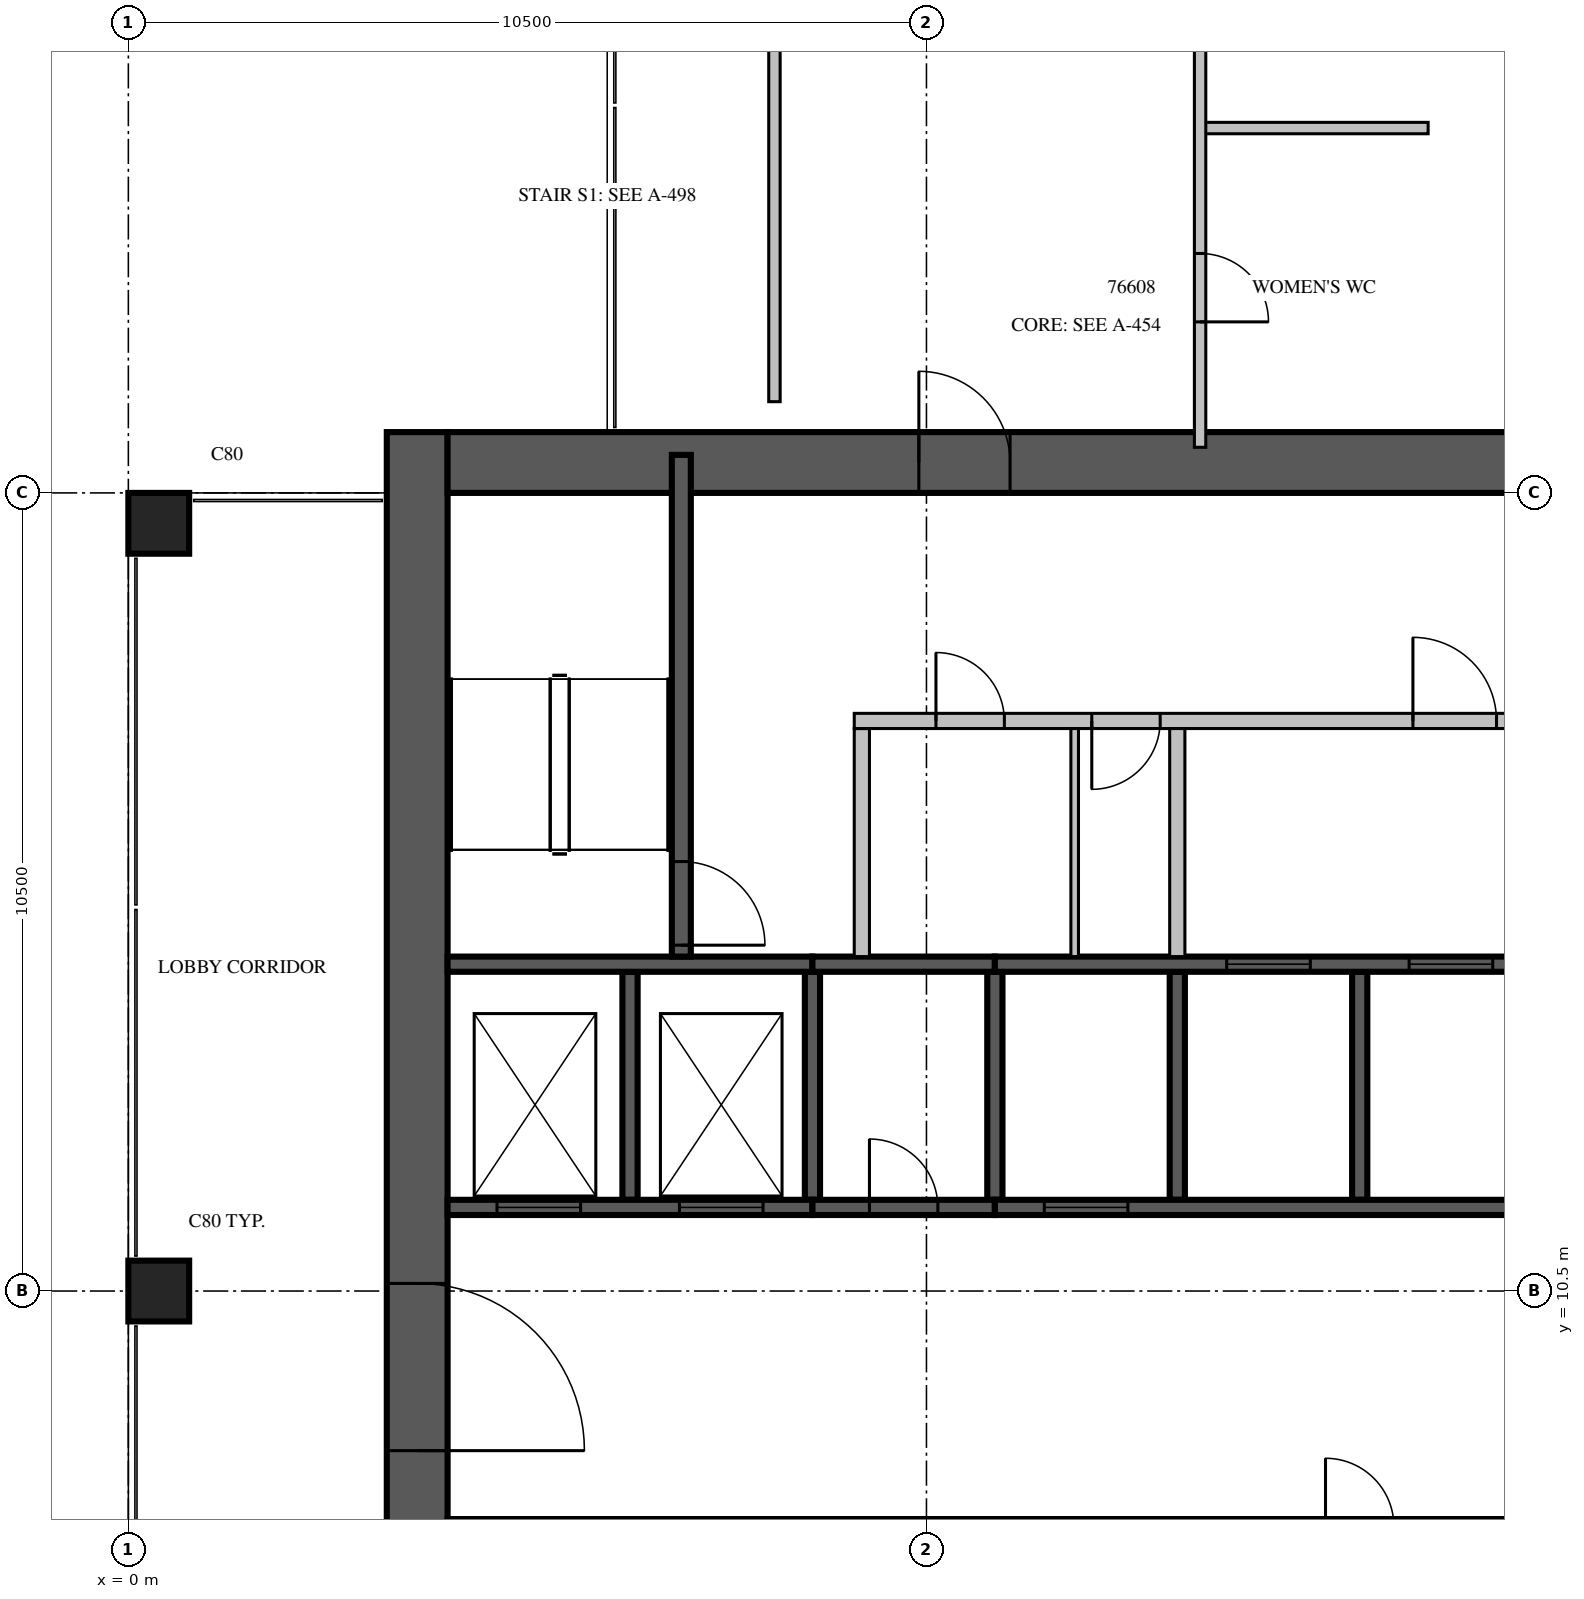
"""IFC4 building model, lengths in metres.
Left out: names, types, materials, properties, quantities, classifications, styles, units other than length and angle.
Written with IfcOpenShell. Run it as: python <this file> out.ifc"""

import sys

from ifc_helpers import new_model, si_unit, direction, frame, frame_2d, origin, origin_2d, place, context, subcontext, project, spatial, rectangle, extrude, source, transform, mapped, element, fill, save


model = new_model("IFC4")
c1 = context("Model", 3, precision=1e-05, world=origin(), true_north=direction((0.0, 1.0)))
c2 = subcontext(c1, "Body", "Model", "MODEL_VIEW")
j1 = project(units=[si_unit("LENGTHUNIT", "METRE"), si_unit("PLANEANGLEUNIT", "RADIAN")], contexts=[c1])
p1 = place(None, origin())
s1 = spatial("IfcSite", under=j1, at=p1, CompositionType="ELEMENT")
p2 = place(p1, origin())
s2 = spatial("IfcBuilding", under=s1, at=p2, CompositionType="ELEMENT")
p3 = place(p2, frame((0.0, 0.0, 277.0)))
s3 = spatial("IfcBuildingStorey", under=s2, at=p3, CompositionType="ELEMENT", Elevation=277.0)
m1 = source(origin(), c2, "Body", "SweptSolid", [
    extrude(rectangle(XDim=0.8, YDim=0.8, at=origin_2d()), origin(), (0.0, 0.0, 1.0), 7.5),
])
for number, where, z_axis, x_axis in (
    (1, (0.4, 10.5, 0.0), (0.0, 0.0, 1.0), (1.0, 0.0, 0.0)),
    (2, (0.4, 20.6, 0.0), (0.0, 0.0, 1.0), (1.0, 0.0, 0.0)),
):
    element("IfcColumn", number, at=place(p3, frame(where, z_axis=z_axis, x_axis=x_axis)), inside=s3, PredefinedType="COLUMN", context=c2, shape_type="MappedRepresentation", body=[
        mapped(m1, transform((0.0, 0.0, 0.0), scale=1.0)),
    ])
p4 = place(p3, frame((3.8, 4.2, 0.0), z_axis=(0.0, 0.0, 1.0), x_axis=(0.0, 1.0, 0.0)))
e3 = element("IfcWall", 3, at=p4, inside=s3, PredefinedType="SHEAR", context=c2, shape_type="SweptSolid", body=[
    extrude(rectangle(XDim=17.6, YDim=0.8, at=frame_2d((8.8, 0.0))), origin(), (0.0, 0.0, 1.0), 7.5),
])
m2 = source(origin(), c2, "Body", "SweptSolid", [
    extrude(rectangle(XDim=2.2, YDim=2.1, at=frame_2d((1.1, 1.05))), frame((0.0, 0.41, 0.0), z_axis=(0.0, -1.0, 0.0), x_axis=(1.0, 0.0, 0.0)), (0.0, 0.0, 1.0), 0.82),
])
p5 = place(p4, frame((4.2, 0.0, 0.0)))
e4 = element("IfcOpeningElement", 4, at=p5, cuts=e3, PredefinedType="OPENING", context=c2, shape_type="MappedRepresentation", body=[
    mapped(m2, transform((0.0, 0.0, 0.0), scale=1.0)),
])
m3 = source(origin(), c2, "Body", "SweptSolid", [
    extrude(rectangle(XDim=16.8, YDim=0.8, at=frame_2d((8.4, 0.0))), origin(), (0.0, 0.0, 1.0), 7.5),
])
p6 = place(p3, frame((4.2, 21.4, 0.0), z_axis=(0.0, 0.0, 1.0), x_axis=(1.0, 0.0, 0.0)))
e5 = element("IfcWall", 5, at=p6, inside=s3, PredefinedType="SHEAR", context=c2, shape_type="MappedRepresentation", body=[
    mapped(m3, transform((0.0, 0.0, 0.0), scale=1.0)),
])
m4 = source(origin(), c2, "Body", "SweptSolid", [
    extrude(rectangle(XDim=1.2, YDim=2.1, at=frame_2d((0.6, 1.05))), frame((0.0, 0.41, 0.0), z_axis=(0.0, -1.0, 0.0), x_axis=(1.0, 0.0, 0.0)), (0.0, 0.0, 1.0), 0.82),
])
p7 = place(p6, frame((6.2, 0.0, 0.0)))
e6 = element("IfcOpeningElement", 6, at=p7, cuts=e5, PredefinedType="OPENING", context=c2, shape_type="MappedRepresentation", body=[
    mapped(m4, transform((0.0, 0.0, 0.0), scale=1.0)),
])
m5 = source(origin(), c2, "Body", "SweptSolid", [
    extrude(rectangle(XDim=3.0, YDim=0.2, at=frame_2d((1.5, 0.0))), origin(), (0.0, 0.0, 1.0), 7.5),
])
p8 = place(p3, frame((6.6, 11.7, 0.0), z_axis=(0.0, 0.0, 1.0), x_axis=(0.0, 1.0, 0.0)))
e7 = element("IfcWall", 7, at=p8, inside=s3, PredefinedType="SOLIDWALL", context=c2, shape_type="MappedRepresentation", body=[
    mapped(m5, transform((0.0, 0.0, 0.0), scale=1.0)),
])
m6 = source(origin(), c2, "Body", "SweptSolid", [
    extrude(rectangle(XDim=3.0, YDim=0.2, at=frame_2d((1.5, 0.0))), origin(), (0.0, 0.0, 1.0), 7.1),
])
for number, where, z_axis, x_axis in (
    (8, (9.0, 11.7, 0.0), (0.0, 0.0, 1.0), (0.0, 1.0, 0.0)),
    (9, (11.4, 11.7, 0.0), (0.0, 0.0, 1.0), (0.0, 1.0, 0.0)),
):
    element("IfcWall", number, at=place(p3, frame(where, z_axis=z_axis, x_axis=x_axis)), inside=s3, PredefinedType="SOLIDWALL", context=c2, shape_type="MappedRepresentation", body=[
        mapped(m6, transform((0.0, 0.0, 0.0), scale=1.0)),
    ])
for number, where, z_axis, x_axis in (
    (10, (13.8, 11.7, 0.0), (0.0, 0.0, 1.0), (0.0, 1.0, 0.0)),
    (11, (16.2, 11.7, 0.0), (0.0, 0.0, 1.0), (0.0, 1.0, 0.0)),
):
    element("IfcWall", number, at=place(p3, frame(where, z_axis=z_axis, x_axis=x_axis)), inside=s3, PredefinedType="SOLIDWALL", context=c2, shape_type="MappedRepresentation", body=[
        mapped(m5, transform((0.0, 0.0, 0.0), scale=1.0)),
    ])
m7 = source(origin(), c2, "Body", "SweptSolid", [
    extrude(rectangle(XDim=4.8, YDim=0.2, at=frame_2d((2.4, 0.0))), origin(), (0.0, 0.0, 1.0), 7.5),
])
p9 = place(p3, frame((4.2, 11.6, 0.0), z_axis=(0.0, 0.0, 1.0), x_axis=(1.0, 0.0, 0.0)))
e12 = element("IfcWall", 12, at=p9, inside=s3, PredefinedType="SOLIDWALL", context=c2, shape_type="MappedRepresentation", body=[
    mapped(m7, transform((0.0, 0.0, 0.0), scale=1.0)),
])
m8 = source(origin(), c2, "Body", "SweptSolid", [
    extrude(rectangle(XDim=1.1, YDim=2.1, at=frame_2d((0.55, 1.05))), frame((0.0, 0.11, 0.0), z_axis=(0.0, -1.0, 0.0), x_axis=(1.0, 0.0, 0.0)), (0.0, 0.0, 1.0), 0.22),
])
p10 = place(p9, frame((0.65, 0.0, 0.0)))
e13 = element("IfcOpeningElement", 13, at=p10, cuts=e12, PredefinedType="OPENING", context=c2, shape_type="MappedRepresentation", body=[
    mapped(m8, transform((0.0, 0.0, 0.0), scale=1.0)),
])
p11 = place(p9, frame((3.05, 0.0, 0.0)))
e14 = element("IfcOpeningElement", 14, at=p11, cuts=e12, PredefinedType="OPENING", context=c2, shape_type="MappedRepresentation", body=[
    mapped(m8, transform((0.0, 0.0, 0.0), scale=1.0)),
])
m9 = source(origin(), c2, "Body", "SweptSolid", [
    extrude(rectangle(XDim=2.4, YDim=0.2, at=frame_2d((1.2, 0.0))), origin(), (0.0, 0.0, 1.0), 7.1),
])
p12 = place(p3, frame((9.0, 11.6, 0.0), z_axis=(0.0, 0.0, 1.0), x_axis=(1.0, 0.0, 0.0)))
e15 = element("IfcWall", 15, at=p12, inside=s3, PredefinedType="SOLIDWALL", context=c2, shape_type="MappedRepresentation", body=[
    mapped(m9, transform((0.0, 0.0, 0.0), scale=1.0)),
])
m10 = source(origin(), c2, "Body", "SweptSolid", [
    extrude(rectangle(XDim=0.9, YDim=2.1, at=frame_2d((0.45, 1.05))), frame((0.0, 0.11, 0.0), z_axis=(0.0, -1.0, 0.0), x_axis=(1.0, 0.0, 0.0)), (0.0, 0.0, 1.0), 0.22),
])
p13 = place(p12, frame((0.75, 0.0, 0.0)))
e16 = element("IfcOpeningElement", 16, at=p13, cuts=e15, PredefinedType="OPENING", context=c2, shape_type="MappedRepresentation", body=[
    mapped(m10, transform((0.0, 0.0, 0.0), scale=1.0)),
])
m11 = source(origin(), c2, "Body", "SweptSolid", [
    extrude(rectangle(XDim=9.6, YDim=0.2, at=frame_2d((4.8, 0.0))), origin(), (0.0, 0.0, 1.0), 7.5),
])
p14 = place(p3, frame((11.4, 11.6, 0.0), z_axis=(0.0, 0.0, 1.0), x_axis=(1.0, 0.0, 0.0)))
e17 = element("IfcWall", 17, at=p14, inside=s3, PredefinedType="SOLIDWALL", context=c2, shape_type="MappedRepresentation", body=[
    mapped(m11, transform((0.0, 0.0, 0.0), scale=1.0)),
])
p15 = place(p14, frame((0.65, 0.0, 0.0)))
e18 = element("IfcOpeningElement", 18, at=p15, cuts=e17, PredefinedType="OPENING", context=c2, shape_type="MappedRepresentation", body=[
    mapped(m8, transform((0.0, 0.0, 0.0), scale=1.0)),
])
p16 = place(p3, frame((4.2, 14.8, 0.0), z_axis=(0.0, 0.0, 1.0), x_axis=(1.0, 0.0, 0.0)))
e19 = element("IfcWall", 19, at=p16, inside=s3, PredefinedType="SOLIDWALL", context=c2, shape_type="MappedRepresentation", body=[
    mapped(m7, transform((0.0, 0.0, 0.0), scale=1.0)),
])
p17 = place(p3, frame((9.0, 14.8, 0.0), z_axis=(0.0, 0.0, 1.0), x_axis=(1.0, 0.0, 0.0)))
e20 = element("IfcWall", 20, at=p17, inside=s3, PredefinedType="SOLIDWALL", context=c2, shape_type="MappedRepresentation", body=[
    mapped(m9, transform((0.0, 0.0, 0.0), scale=1.0)),
])
p18 = place(p3, frame((11.4, 14.8, 0.0), z_axis=(0.0, 0.0, 1.0), x_axis=(1.0, 0.0, 0.0)))
e21 = element("IfcWall", 21, at=p18, inside=s3, PredefinedType="SOLIDWALL", context=c2, shape_type="MappedRepresentation", body=[
    mapped(m11, transform((0.0, 0.0, 0.0), scale=1.0)),
])
p19 = place(p18, frame((3.05, 0.0, 0.0)))
e22 = element("IfcOpeningElement", 22, at=p19, cuts=e21, PredefinedType="OPENING", context=c2, shape_type="MappedRepresentation", body=[
    mapped(m8, transform((0.0, 0.0, 0.0), scale=1.0)),
])
p20 = place(p18, frame((5.45, 0.0, 0.0)))
e23 = element("IfcOpeningElement", 23, at=p20, cuts=e21, PredefinedType="OPENING", context=c2, shape_type="MappedRepresentation", body=[
    mapped(m8, transform((0.0, 0.0, 0.0), scale=1.0)),
])
p21 = place(p18, frame((7.85, 0.0, 0.0)))
e24 = element("IfcOpeningElement", 24, at=p21, cuts=e21, PredefinedType="OPENING", context=c2, shape_type="MappedRepresentation", body=[
    mapped(m8, transform((0.0, 0.0, 0.0), scale=1.0)),
])
m12 = source(origin(), c2, "Body", "SweptSolid", [
    extrude(rectangle(XDim=6.6, YDim=0.25, at=frame_2d((3.3, 0.0))), origin(), (0.0, 0.0, 1.0), 7.1),
])
p22 = place(p3, frame((7.275, 14.9, 0.0), z_axis=(0.0, 0.0, 1.0), x_axis=(0.0, 1.0, 0.0)))
e25 = element("IfcWall", 25, at=p22, inside=s3, PredefinedType="SOLIDWALL", context=c2, shape_type="MappedRepresentation", body=[
    mapped(m12, transform((0.0, 0.0, 0.0), scale=1.0)),
])
m13 = source(origin(), c2, "Body", "SweptSolid", [
    extrude(rectangle(XDim=1.1, YDim=2.1, at=frame_2d((0.55, 1.05))), frame((0.0, 0.135, 0.0), z_axis=(0.0, -1.0, 0.0), x_axis=(1.0, 0.0, 0.0)), (0.0, 0.0, 1.0), 0.27),
])
p23 = place(p22, frame((0.15, 0.0, 0.0)))
e26 = element("IfcOpeningElement", 26, at=p23, cuts=e25, PredefinedType="OPENING", context=c2, shape_type="MappedRepresentation", body=[
    mapped(m13, transform((0.0, 0.0, 0.0), scale=1.0)),
])
m14 = source(origin(), c2, "Body", "SweptSolid", [
    extrude(rectangle(XDim=3.0, YDim=0.2, at=frame_2d((1.5, 0.0))), origin(), (0.0, 0.0, 1.0), 7.1),
])
p24 = place(p3, frame((9.65, 14.9, 0.0), z_axis=(0.0, 0.0, 1.0), x_axis=(0.0, 1.0, 0.0)))
e27 = element("IfcWall", 27, at=p24, inside=s3, PredefinedType="PARTITIONING", context=c2, shape_type="MappedRepresentation", body=[
    mapped(m14, transform((0.0, 0.0, 0.0), scale=1.0)),
])
m15 = source(origin(), c2, "Body", "SweptSolid", [
    extrude(rectangle(XDim=11.45, YDim=0.2, at=frame_2d((5.725, 0.0))), origin(), (0.0, 0.0, 1.0), 7.1),
])
p25 = place(p3, frame((9.55, 18.0, 0.0), z_axis=(0.0, 0.0, 1.0), x_axis=(1.0, 0.0, 0.0)))
e28 = element("IfcWall", 28, at=p25, inside=s3, PredefinedType="PARTITIONING", context=c2, shape_type="MappedRepresentation", body=[
    mapped(m15, transform((0.0, 0.0, 0.0), scale=1.0)),
])
p26 = place(p25, frame((1.075, 0.0, 0.0)))
e29 = element("IfcOpeningElement", 29, at=p26, cuts=e28, PredefinedType="OPENING", context=c2, shape_type="MappedRepresentation", body=[
    mapped(m10, transform((0.0, 0.0, 0.0), scale=1.0)),
])
p27 = place(p25, frame((3.125, 0.0, 0.0)))
e30 = element("IfcOpeningElement", 30, at=p27, cuts=e28, PredefinedType="OPENING", context=c2, shape_type="MappedRepresentation", body=[
    mapped(m10, transform((0.0, 0.0, 0.0), scale=1.0)),
])
p28 = place(p25, frame((7.35, 0.0, 0.0)))
e31 = element("IfcOpeningElement", 31, at=p28, cuts=e28, PredefinedType="OPENING", context=c2, shape_type="MappedRepresentation", body=[
    mapped(m8, transform((0.0, 0.0, 0.0), scale=1.0)),
])
p29 = place(p3, frame((13.8, 14.9, 0.0), z_axis=(0.0, 0.0, 1.0), x_axis=(0.0, 1.0, 0.0)))
e32 = element("IfcWall", 32, at=p29, inside=s3, PredefinedType="PARTITIONING", context=c2, shape_type="MappedRepresentation", body=[
    mapped(m14, transform((0.0, 0.0, 0.0), scale=1.0)),
])
m16 = source(origin(), c2, "Body", "SweptSolid", [
    extrude(rectangle(XDim=3.0, YDim=0.1, at=frame_2d((1.5, 0.0))), origin(), (0.0, 0.0, 1.0), 7.1),
])
p30 = place(p3, frame((12.45, 14.9, 0.0), z_axis=(0.0, 0.0, 1.0), x_axis=(0.0, 1.0, 0.0)))
e33 = element("IfcWall", 33, at=p30, inside=s3, PredefinedType="PARTITIONING", context=c2, shape_type="MappedRepresentation", body=[
    mapped(m16, transform((0.0, 0.0, 0.0), scale=1.0)),
])
m17 = source(origin(), c2, "Body", "SweptSolid", [
    extrude(rectangle(XDim=3.0, YDim=0.15, at=frame_2d((1.5, 0.0))), origin(), (0.0, 0.0, 1.0), 7.1),
])
p31 = place(p3, frame((14.1, 25.8, 0.0), z_axis=(0.0, 0.0, 1.0), x_axis=(1.0, 0.0, 0.0)))
e34 = element("IfcWall", 34, at=p31, inside=s3, PredefinedType="PARTITIONING", context=c2, shape_type="MappedRepresentation", body=[
    mapped(m17, transform((0.0, 0.0, 0.0), scale=1.0)),
])
m18 = source(origin(), c2, "Body", "SweptSolid", [
    extrude(rectangle(XDim=16.2, YDim=0.15, at=frame_2d((8.1, 0.0))), origin(), (0.0, 0.0, 1.0), 7.1),
])
p32 = place(p3, frame((8.5, 22.2, 0.0), z_axis=(0.0, 0.0, 1.0), x_axis=(0.0, 1.0, 0.0)))
e35 = element("IfcWall", 35, at=p32, inside=s3, PredefinedType="PARTITIONING", context=c2, shape_type="MappedRepresentation", body=[
    mapped(m18, transform((0.0, 0.0, 0.0), scale=1.0)),
])
m19 = source(origin(), c2, "Body", "SweptSolid", [
    extrude(rectangle(XDim=0.9, YDim=2.1, at=frame_2d((0.45, 1.05))), frame((0.0, 0.085, 0.0), z_axis=(0.0, -1.0, 0.0), x_axis=(1.0, 0.0, 0.0)), (0.0, 0.0, 1.0), 0.17),
])
p33 = place(p32, frame((7.95, 0.0, 0.0)))
e36 = element("IfcOpeningElement", 36, at=p33, cuts=e35, PredefinedType="OPENING", context=c2, shape_type="MappedRepresentation", body=[
    mapped(m19, transform((0.0, 0.0, 0.0), scale=1.0)),
])
m20 = source(origin(), c2, "Body", "SweptSolid", [
    extrude(rectangle(XDim=12.6, YDim=0.15, at=frame_2d((6.3, 0.0))), origin(), (0.0, 0.0, 1.0), 7.1),
])
p34 = place(p3, frame((14.1, 21.6, 0.0), z_axis=(0.0, 0.0, 1.0), x_axis=(0.0, 1.0, 0.0)))
e37 = element("IfcWall", 37, at=p34, inside=s3, PredefinedType="PARTITIONING", context=c2, shape_type="MappedRepresentation", body=[
    mapped(m20, transform((0.0, 0.0, 0.0), scale=1.0)),
])
p35 = place(p34, frame((1.65, 0.0, 0.0)))
e38 = element("IfcOpeningElement", 38, at=p35, cuts=e37, PredefinedType="OPENING", context=c2, shape_type="MappedRepresentation", body=[
    mapped(m19, transform((0.0, 0.0, 0.0), scale=1.0)),
])
p36 = place(p34, frame((5.85, 0.0, 0.0)))
e39 = element("IfcOpeningElement", 39, at=p36, cuts=e37, PredefinedType="OPENING", context=c2, shape_type="MappedRepresentation", body=[
    mapped(m19, transform((0.0, 0.0, 0.0), scale=1.0)),
])
p37 = place(p34, frame((10.05, 0.0, 0.0)))
e40 = element("IfcOpeningElement", 40, at=p37, cuts=e37, PredefinedType="OPENING", context=c2, shape_type="MappedRepresentation", body=[
    mapped(m19, transform((0.0, 0.0, 0.0), scale=1.0)),
])
m21 = source(origin(), c2, "Body", "SweptSolid", [
    extrude(rectangle(XDim=1.1, YDim=2.1, at=frame_2d((0.55, 1.05))), frame((0.0, 0.025, 0.0), z_axis=(0.0, -1.0, 0.0), x_axis=(1.0, 0.0, 0.0)), (0.0, 0.0, 1.0), 0.05),
])
p38 = place(p10, origin())
e41 = element("IfcDoor", 41, at=p38, inside=s3, OperationType="SLIDING_TO_LEFT", PredefinedType="DOOR", context=c2, shape_type="MappedRepresentation", body=[
    mapped(m21, transform((0.0, 0.0, 0.0), scale=1.0)),
])
fill(e13, e41)
p39 = place(p11, origin())
e42 = element("IfcDoor", 42, at=p39, inside=s3, OperationType="SLIDING_TO_LEFT", PredefinedType="DOOR", context=c2, shape_type="MappedRepresentation", body=[
    mapped(m21, transform((0.0, 0.0, 0.0), scale=1.0)),
])
fill(e14, e42)
m22 = source(origin(), c2, "Body", "SweptSolid", [
    extrude(rectangle(XDim=0.9, YDim=2.1, at=frame_2d((0.45, 1.05))), frame((0.0, 0.025, 0.0), z_axis=(0.0, -1.0, 0.0), x_axis=(1.0, 0.0, 0.0)), (0.0, 0.0, 1.0), 0.05),
])
p40 = place(p13, origin())
e43 = element("IfcDoor", 43, at=p40, inside=s3, OperationType="SINGLE_SWING_LEFT", PredefinedType="DOOR", context=c2, shape_type="MappedRepresentation", body=[
    mapped(m22, transform((0.0, 0.0, 0.0), scale=1.0)),
])
fill(e16, e43)
p41 = place(p15, origin())
e44 = element("IfcDoor", 44, at=p41, inside=s3, OperationType="SLIDING_TO_LEFT", PredefinedType="DOOR", context=c2, shape_type="MappedRepresentation", body=[
    mapped(m21, transform((0.0, 0.0, 0.0), scale=1.0)),
])
fill(e18, e44)
p42 = place(p19, origin())
e45 = element("IfcDoor", 45, at=p42, inside=s3, OperationType="SLIDING_TO_LEFT", PredefinedType="DOOR", context=c2, shape_type="MappedRepresentation", body=[
    mapped(m21, transform((0.0, 0.0, 0.0), scale=1.0)),
])
fill(e22, e45)
p43 = place(p20, origin())
e46 = element("IfcDoor", 46, at=p43, inside=s3, OperationType="SLIDING_TO_LEFT", PredefinedType="DOOR", context=c2, shape_type="MappedRepresentation", body=[
    mapped(m21, transform((0.0, 0.0, 0.0), scale=1.0)),
])
fill(e23, e46)
p44 = place(p23, origin())
e47 = element("IfcDoor", 47, at=p44, inside=s3, OperationType="SINGLE_SWING_RIGHT", PredefinedType="DOOR", context=c2, shape_type="MappedRepresentation", body=[
    mapped(m21, transform((0.0, 0.0, 0.0), scale=1.0)),
])
fill(e26, e47)
p45 = place(p26, origin())
e48 = element("IfcDoor", 48, at=p45, inside=s3, OperationType="SINGLE_SWING_LEFT", PredefinedType="DOOR", context=c2, shape_type="MappedRepresentation", body=[
    mapped(m22, transform((0.0, 0.0, 0.0), scale=1.0)),
])
fill(e29, e48)
p46 = place(p27, origin())
e49 = element("IfcDoor", 49, at=p46, inside=s3, OperationType="SINGLE_SWING_RIGHT", PredefinedType="DOOR", context=c2, shape_type="MappedRepresentation", body=[
    mapped(m22, transform((0.0, 0.0, 0.0), scale=1.0)),
])
fill(e30, e49)
p47 = place(p28, origin())
e50 = element("IfcDoor", 50, at=p47, inside=s3, OperationType="SINGLE_SWING_LEFT", PredefinedType="DOOR", context=c2, shape_type="MappedRepresentation", body=[
    mapped(m21, transform((0.0, 0.0, 0.0), scale=1.0)),
])
fill(e31, e50)
m23 = source(origin(), c2, "Body", "SweptSolid", [
    extrude(rectangle(XDim=2.2, YDim=2.1, at=frame_2d((1.1, 1.05))), frame((0.0, 0.025, 0.0), z_axis=(0.0, -1.0, 0.0), x_axis=(1.0, 0.0, 0.0)), (0.0, 0.0, 1.0), 0.05),
])
p48 = place(p5, origin())
e51 = element("IfcDoor", 51, at=p48, inside=s3, OperationType="DOUBLE_DOOR_SINGLE_SWING", PredefinedType="DOOR", context=c2, shape_type="MappedRepresentation", body=[
    mapped(m23, transform((0.0, 0.0, 0.0), scale=1.0)),
])
fill(e4, e51)
m24 = source(origin(), c2, "Body", "SweptSolid", [
    extrude(rectangle(XDim=1.2, YDim=2.1, at=frame_2d((0.6, 1.05))), frame((0.0, 0.025, 0.0), z_axis=(0.0, -1.0, 0.0), x_axis=(1.0, 0.0, 0.0)), (0.0, 0.0, 1.0), 0.05),
])
p49 = place(p7, origin())
e52 = element("IfcDoor", 52, at=p49, inside=s3, OperationType="SINGLE_SWING_LEFT", PredefinedType="DOOR", context=c2, shape_type="MappedRepresentation", body=[
    mapped(m24, transform((0.0, 0.0, 0.0), scale=1.0)),
])
fill(e6, e52)
p50 = place(p35, origin())
e53 = element("IfcDoor", 53, at=p50, inside=s3, OperationType="SINGLE_SWING_RIGHT", PredefinedType="DOOR", context=c2, shape_type="MappedRepresentation", body=[
    mapped(m22, transform((0.0, 0.0, 0.0), scale=1.0)),
])
fill(e38, e53)
save(model, sys.argv[1])
